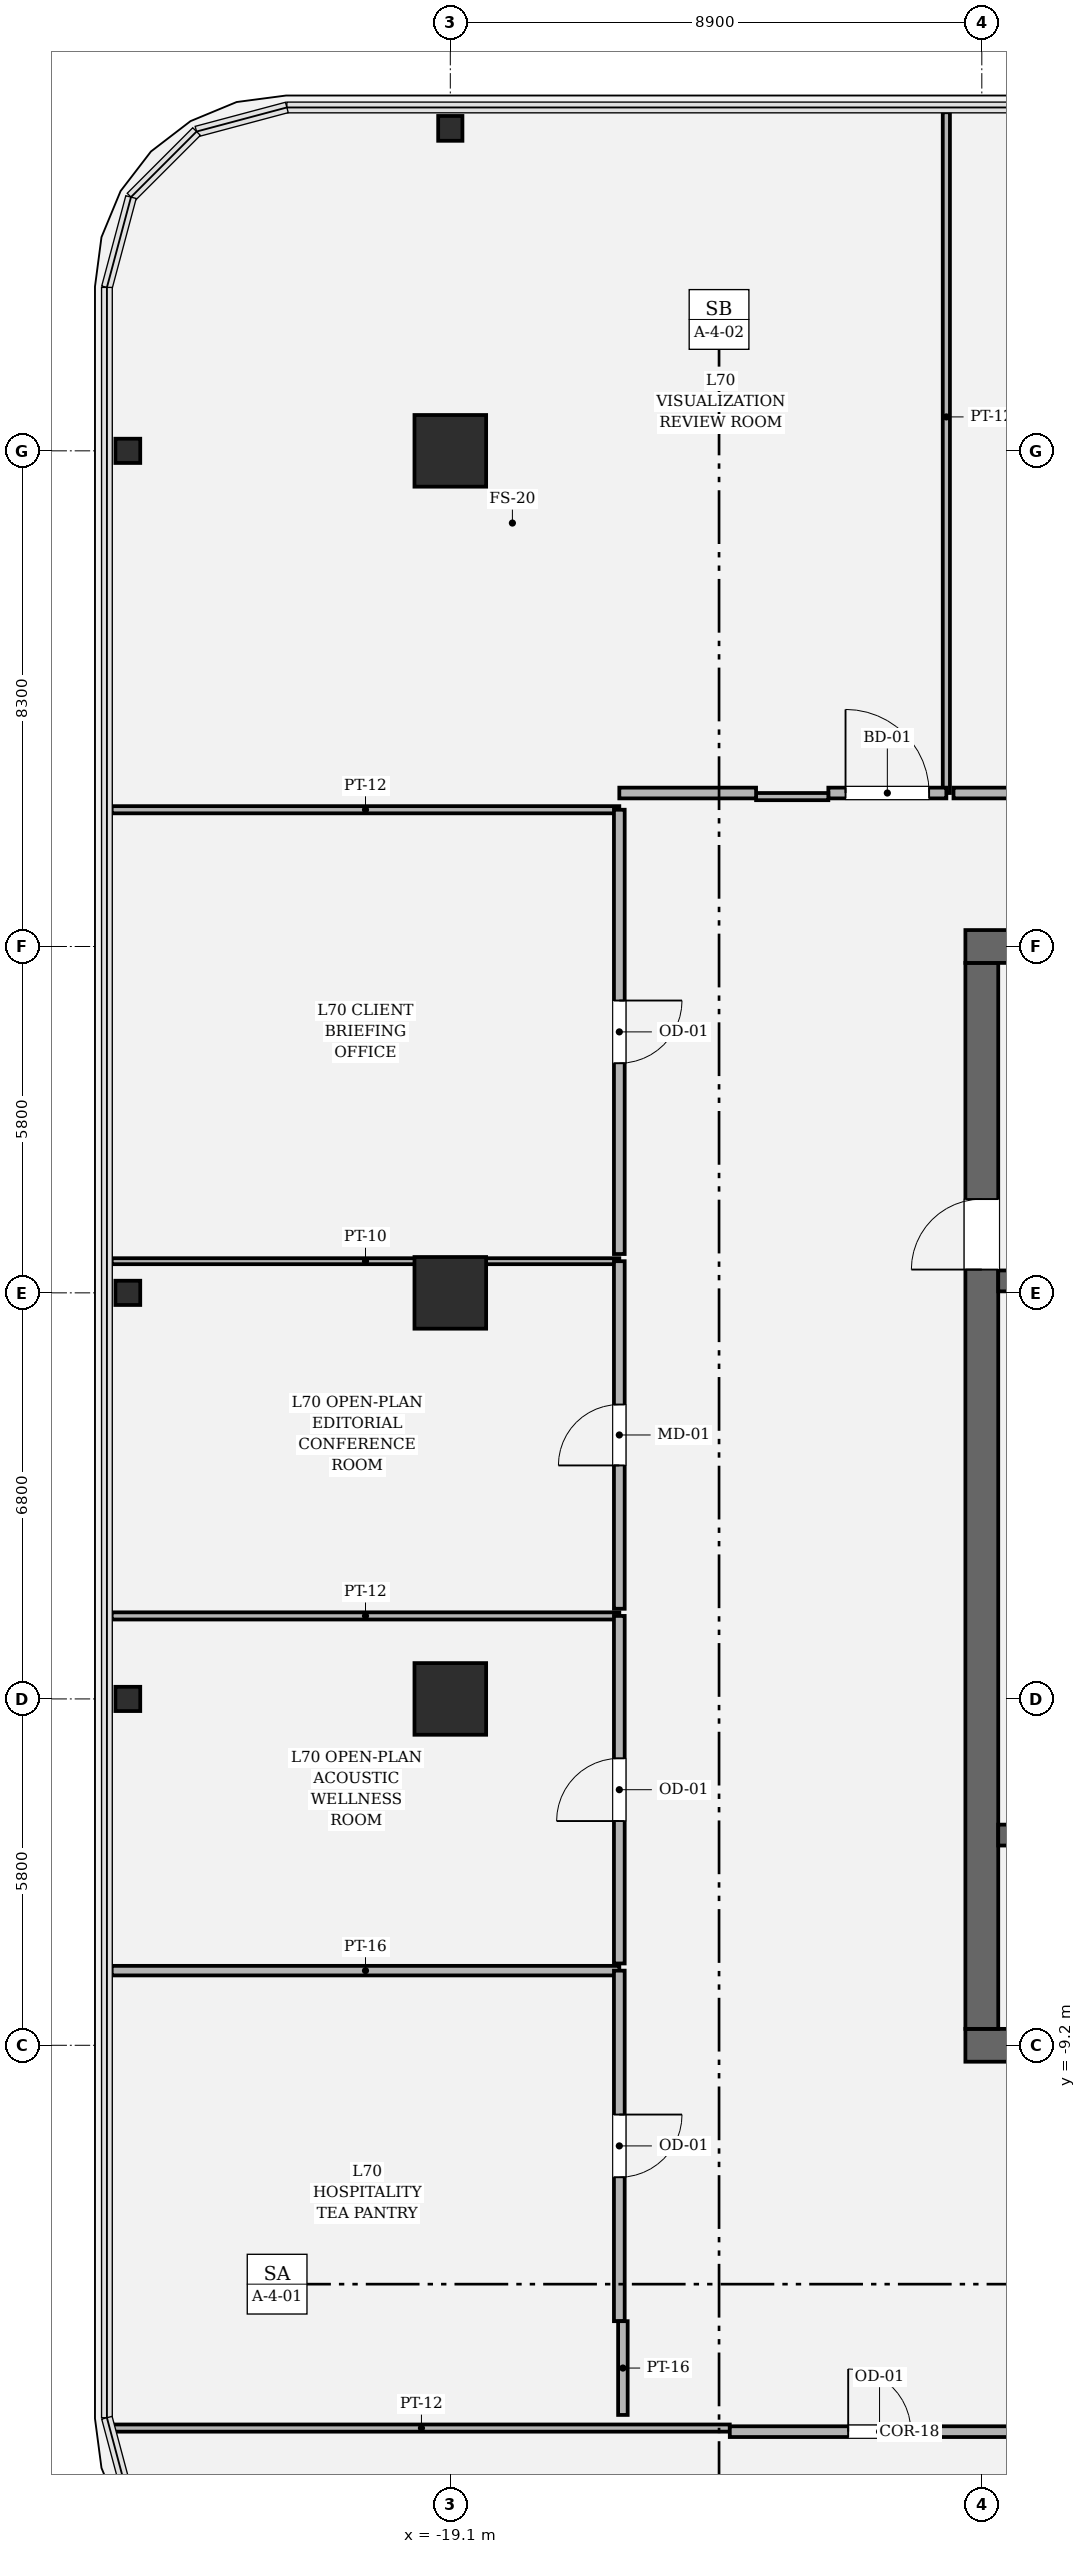
"""IFC4 building model, lengths in metres.
Left out: names, types, materials, properties, quantities, classifications, styles, units other than length and angle.
Written with IfcOpenShell. Run it as: python <this file> out.ifc"""

import sys

from ifc_helpers import new_model, si_unit, direction, frame, frame_2d, origin, origin_2d, place, context, subcontext, project, spatial, rectangle, hollow_rectangle, i_section, extrude, element, fill, save


model = new_model("IFC4")
c1 = context("Model", 3, precision=1e-05, world=origin(), true_north=direction((0.0, 1.0)))
c2 = subcontext(c1, "Body", "Model", "MODEL_VIEW")
j1 = project(units=[si_unit("LENGTHUNIT", "METRE"), si_unit("PLANEANGLEUNIT", "RADIAN")], contexts=[c1])
p1 = place(None, origin())
s1 = spatial("IfcSite", under=j1, at=p1, CompositionType="ELEMENT")
p2 = place(p1, origin())
s2 = spatial("IfcBuilding", under=s1, at=p2, CompositionType="ELEMENT")
p3 = place(p2, frame((0.0, 0.0, 296.4)))
s3 = spatial("IfcBuildingStorey", under=s2, at=p3, CompositionType="ELEMENT", Elevation=296.4)
p4 = place(p3, frame((10.475, -9.2, 0.0), z_axis=(0.0, 0.0, 1.0), x_axis=(-1.0, 0.0, 0.0)))
e1 = element("IfcWall", 1, at=p4, inside=s3, PredefinedType="SHEAR", context=c2, shape_type="SweptSolid", body=[
    extrude(rectangle(XDim=20.95, YDim=0.55, at=frame_2d((10.475, 0.0))), origin(), (0.0, 0.0, 1.0), 4.2),
])
p5 = place(p4, frame((2.75, 0.0, 0.0)))
e2 = element("IfcOpeningElement", 2, at=p5, cuts=e1, PredefinedType="OPENING", context=c2, shape_type="SweptSolid", body=[
    extrude(rectangle(XDim=1.25, YDim=2.25, at=frame_2d((0.625, 1.125))), frame((0.0, 0.285, 0.0), z_axis=(0.0, -1.0, 0.0), x_axis=(1.0, 0.0, 0.0)), (0.0, 0.0, 1.0), 0.57),
])
p6 = place(p4, frame((16.95, 0.0, 0.0)))
e3 = element("IfcOpeningElement", 3, at=p6, cuts=e1, PredefinedType="OPENING", context=c2, shape_type="SweptSolid", body=[
    extrude(rectangle(XDim=1.25, YDim=2.25, at=frame_2d((0.625, 1.125))), frame((0.0, 0.285, 0.0), z_axis=(0.0, -1.0, 0.0), x_axis=(1.0, 0.0, 0.0)), (0.0, 0.0, 1.0), 0.57),
])
p7 = place(p3, frame((-10.2, -8.925, 0.0), z_axis=(0.0, 0.0, 1.0), x_axis=(0.0, 1.0, 0.0)))
e4 = element("IfcWall", 4, at=p7, inside=s3, PredefinedType="SHEAR", context=c2, shape_type="SweptSolid", body=[
    extrude(rectangle(XDim=17.85, YDim=0.55, at=frame_2d((8.925, 0.0))), origin(), (0.0, 0.0, 1.0), 4.2),
])
p8 = place(p7, frame((12.715, 0.0, 0.0)))
e5 = element("IfcOpeningElement", 5, at=p8, cuts=e4, PredefinedType="OPENING", context=c2, shape_type="SweptSolid", body=[
    extrude(rectangle(XDim=1.18, YDim=2.2, at=frame_2d((0.59, 1.1))), frame((0.0, 0.285, 0.0), z_axis=(0.0, -1.0, 0.0), x_axis=(1.0, 0.0, 0.0)), (0.0, 0.0, 1.0), 0.57),
])
p9 = place(p3, frame((-10.475, 9.2, 0.0), z_axis=(0.0, 0.0, 1.0), x_axis=(1.0, 0.0, 0.0)))
e6 = element("IfcWall", 6, at=p9, inside=s3, PredefinedType="SHEAR", context=c2, shape_type="SweptSolid", body=[
    extrude(rectangle(XDim=20.95, YDim=0.55, at=frame_2d((10.475, 0.0))), origin(), (0.0, 0.0, 1.0), 4.2),
])
p10 = place(p3, frame((-9.925, -5.68, 0.0), z_axis=(0.0, 0.0, 1.0), x_axis=(1.0, 0.0, 0.0)))
e7 = element("IfcWall", 7, at=p10, inside=s3, PredefinedType="SOLIDWALL", context=c2, shape_type="SweptSolid", body=[
    extrude(rectangle(XDim=5.275, YDim=0.35, at=frame_2d((2.638, 0.0))), origin(), (0.0, 0.0, 1.0), 4.2),
])
p11 = place(p10, frame((1.385, 0.0, 0.0)))
e8 = element("IfcOpeningElement", 8, at=p11, cuts=e7, PredefinedType="OPENING", context=c2, shape_type="SweptSolid", body=[
    extrude(rectangle(XDim=1.18, YDim=2.2, at=frame_2d((0.59, 1.1))), frame((0.0, 0.185, 0.0), z_axis=(0.0, -1.0, 0.0), x_axis=(1.0, 0.0, 0.0)), (0.0, 0.0, 1.0), 0.37),
])
p12 = place(p3, frame((-9.925, 3.6, 0.0), z_axis=(0.0, 0.0, 1.0), x_axis=(1.0, 0.0, 0.0)))
e9 = element("IfcWall", 9, at=p12, inside=s3, PredefinedType="SOLIDWALL", context=c2, shape_type="SweptSolid", body=[
    extrude(rectangle(XDim=5.275, YDim=0.35, at=frame_2d((2.638, 0.0))), origin(), (0.0, 0.0, 1.0), 4.2),
])
for number, where, z_axis, x_axis in (
    (10, (-19.1, 17.5, 0.0), (0.0, 0.0, 1.0), (1.0, 0.0, 0.0)),
    (11, (-19.1, 3.4, 0.0), (0.0, 0.0, 1.0), (1.0, 0.0, 0.0)),
    (12, (-19.1, -3.4, 0.0), (0.0, 0.0, 1.0), (1.0, 0.0, 0.0)),
):
    element("IfcColumn", number, at=place(p3, frame(where, z_axis=z_axis, x_axis=x_axis)), inside=s3, PredefinedType="COLUMN", context=c2, shape_type="SweptSolid", body=[
        extrude(hollow_rectangle(XDim=1.2, YDim=1.2, WallThickness=0.035, at=origin_2d()), origin(), (0.0, 0.0, 1.0), 4.2),
    ])
for number, where, z_axis, x_axis in (
    (13, (-19.1, 22.9, 0.0), (0.0, 0.0, 1.0), (1.0, 0.0, 0.0)),
    (14, (-24.5, -3.4, 0.0), (0.0, 0.0, 1.0), (0.0, 1.0, 0.0)),
    (15, (-24.5, 3.4, 0.0), (0.0, 0.0, 1.0), (0.0, 1.0, 0.0)),
    (16, (-24.5, 17.5, 0.0), (0.0, 0.0, 1.0), (0.0, 1.0, 0.0)),
):
    element("IfcColumn", number, at=place(p3, frame(where, z_axis=z_axis, x_axis=x_axis)), inside=s3, PredefinedType="COLUMN", context=c2, shape_type="SweptSolid", body=[
        extrude(i_section(OverallWidth=0.406, OverallDepth=0.416, WebThickness=0.029, FlangeThickness=0.048, FilletRadius=0.018, at=origin_2d()), origin(), (0.0, 0.0, 1.0), 4.198),
    ])
p13 = place(p3, frame((-24.747, -15.61, 0.0), z_axis=(0.0, 0.0, 1.0), x_axis=(1.0, 0.0, 0.0)))
e17 = element("IfcWall", 17, at=p13, inside=s3, PredefinedType="PARTITIONING", context=c2, shape_type="SweptSolid", body=[
    extrude(rectangle(XDim=10.327, YDim=0.12, at=frame_2d((5.163, 0.0))), origin(), (0.0, 0.0, 1.0), 2.714),
])
p14 = place(p3, frame((-14.42, -15.67, 0.0), z_axis=(0.0, 0.0, 1.0), x_axis=(1.0, 0.0, 0.0)))
e18 = element("IfcWall", 18, at=p14, inside=s3, PredefinedType="PARTITIONING", context=c2, shape_type="SweptSolid", body=[
    extrude(rectangle(XDim=5.015, YDim=0.18, at=frame_2d((2.507, 0.0))), origin(), (0.0, 0.0, 1.0), 3.394),
])
p15 = place(p14, frame((1.982, 0.0, 0.0)))
e19 = element("IfcOpeningElement", 19, at=p15, cuts=e18, PredefinedType="OPENING", context=c2, shape_type="SweptSolid", body=[
    extrude(rectangle(XDim=1.05, YDim=2.2, at=frame_2d((0.525, 1.1))), frame((0.0, 0.1, 0.0), z_axis=(0.0, -1.0, 0.0), x_axis=(1.0, 0.0, 0.0)), (0.0, 0.0, 1.0), 0.2),
])
p16 = place(p3, frame((-24.77, -7.95, 0.0), z_axis=(0.0, 0.0, 1.0), x_axis=(1.0, 0.0, 0.0)))
e20 = element("IfcWall", 20, at=p16, inside=s3, PredefinedType="PARTITIONING", context=c2, shape_type="SweptSolid", body=[
    extrude(rectangle(XDim=8.5, YDim=0.16, at=frame_2d((4.25, 0.0))), origin(), (0.0, 0.0, 1.0), 2.714),
])
p17 = place(p3, frame((-16.27, -7.95, 0.0), z_axis=(0.0, 0.0, 1.0), x_axis=(0.0, -1.0, 0.0)))
e21 = element("IfcWall", 21, at=p17, inside=s3, PredefinedType="PARTITIONING", context=c2, shape_type="SweptSolid", body=[
    extrude(rectangle(XDim=5.87, YDim=0.18, at=frame_2d((2.935, 0.0))), origin(), (0.0, 0.0, 1.0), 3.394),
])
p18 = place(p17, frame((2.41, 0.0, 0.0)))
e22 = element("IfcOpeningElement", 22, at=p18, cuts=e21, PredefinedType="OPENING", context=c2, shape_type="SweptSolid", body=[
    extrude(rectangle(XDim=1.05, YDim=2.2, at=frame_2d((0.525, 1.1))), frame((0.0, 0.1, 0.0), z_axis=(0.0, -1.0, 0.0), x_axis=(1.0, 0.0, 0.0)), (0.0, 0.0, 1.0), 0.2),
])
p19 = place(p3, frame((-16.21, -13.82, 0.0), z_axis=(0.0, 0.0, 1.0), x_axis=(0.0, -1.0, 0.0)))
e23 = element("IfcWall", 23, at=p19, inside=s3, PredefinedType="PARTITIONING", context=c2, shape_type="SweptSolid", body=[
    extrude(rectangle(XDim=1.57, YDim=0.16, at=frame_2d((0.785, 0.0))), origin(), (0.0, 0.0, 1.0), 4.0),
])
p20 = place(p3, frame((-24.77, -2.01, 0.0), z_axis=(0.0, 0.0, 1.0), x_axis=(1.0, 0.0, 0.0)))
e24 = element("IfcWall", 24, at=p20, inside=s3, PredefinedType="PARTITIONING", context=c2, shape_type="SweptSolid", body=[
    extrude(rectangle(XDim=8.5, YDim=0.12, at=frame_2d((4.25, 0.0))), origin(), (0.0, 0.0, 1.0), 2.714),
])
p21 = place(p3, frame((-16.27, -2.01, 0.0), z_axis=(0.0, 0.0, 1.0), x_axis=(0.0, -1.0, 0.0)))
e25 = element("IfcWall", 25, at=p21, inside=s3, PredefinedType="PARTITIONING", context=c2, shape_type="SweptSolid", body=[
    extrude(rectangle(XDim=5.82, YDim=0.18, at=frame_2d((2.91, 0.0))), origin(), (0.0, 0.0, 1.0), 3.394),
])
p22 = place(p21, frame((2.385, 0.0, 0.0)))
e26 = element("IfcOpeningElement", 26, at=p22, cuts=e25, PredefinedType="OPENING", context=c2, shape_type="SweptSolid", body=[
    extrude(rectangle(XDim=1.05, YDim=2.2, at=frame_2d((0.525, 1.1))), frame((0.0, 0.1, 0.0), z_axis=(0.0, -1.0, 0.0), x_axis=(1.0, 0.0, 0.0)), (0.0, 0.0, 1.0), 0.2),
])
p23 = place(p3, frame((-24.77, 3.93, 0.0), z_axis=(0.0, 0.0, 1.0), x_axis=(1.0, 0.0, 0.0)))
e27 = element("IfcWall", 27, at=p23, inside=s3, PredefinedType="PARTITIONING", context=c2, shape_type="SweptSolid", body=[
    extrude(rectangle(XDim=8.5, YDim=0.1, at=frame_2d((4.25, 0.0))), origin(), (0.0, 0.0, 1.0), 2.714),
])
p24 = place(p3, frame((-16.27, 3.93, 0.0), z_axis=(0.0, 0.0, 1.0), x_axis=(0.0, -1.0, 0.0)))
e28 = element("IfcWall", 28, at=p24, inside=s3, PredefinedType="PARTITIONING", context=c2, shape_type="SweptSolid", body=[
    extrude(rectangle(XDim=5.82, YDim=0.18, at=frame_2d((2.91, 0.0))), origin(), (0.0, 0.0, 1.0), 3.394),
])
p25 = place(p24, frame((2.4, 0.0, 0.0)))
e29 = element("IfcOpeningElement", 29, at=p25, cuts=e28, PredefinedType="OPENING", context=c2, shape_type="SweptSolid", body=[
    extrude(rectangle(XDim=1.02, YDim=2.2, at=frame_2d((0.51, 1.1))), frame((0.0, 0.1, 0.0), z_axis=(0.0, -1.0, 0.0), x_axis=(1.0, 0.0, 0.0)), (0.0, 0.0, 1.0), 0.2),
])
p26 = place(p3, frame((-24.77, 11.49, 0.0), z_axis=(0.0, 0.0, 1.0), x_axis=(1.0, 0.0, 0.0)))
e30 = element("IfcWall", 30, at=p26, inside=s3, PredefinedType="PARTITIONING", context=c2, shape_type="SweptSolid", body=[
    extrude(rectangle(XDim=8.5, YDim=0.12, at=frame_2d((4.25, 0.0))), origin(), (0.0, 0.0, 1.0), 2.714),
])
p27 = place(p3, frame((-16.27, 11.49, 0.0), z_axis=(0.0, 0.0, 1.0), x_axis=(0.0, -1.0, 0.0)))
e31 = element("IfcWall", 31, at=p27, inside=s3, PredefinedType="PARTITIONING", context=c2, shape_type="SweptSolid", body=[
    extrude(rectangle(XDim=7.44, YDim=0.18, at=frame_2d((3.72, 0.0))), origin(), (0.0, 0.0, 1.0), 3.394),
])
p28 = place(p27, frame((3.195, 0.0, 0.0)))
e32 = element("IfcOpeningElement", 32, at=p28, cuts=e31, PredefinedType="OPENING", context=c2, shape_type="SweptSolid", body=[
    extrude(rectangle(XDim=1.05, YDim=2.2, at=frame_2d((0.525, 1.1))), frame((0.0, 0.1, 0.0), z_axis=(0.0, -1.0, 0.0), x_axis=(1.0, 0.0, 0.0)), (0.0, 0.0, 1.0), 0.2),
])
p29 = place(p3, frame((-10.794, 23.17, 0.0), z_axis=(0.0, 0.0, 1.0), x_axis=(0.0, -1.0, 0.0)))
e33 = element("IfcWall", 33, at=p29, inside=s3, PredefinedType="PARTITIONING", context=c2, shape_type="SweptSolid", body=[
    extrude(rectangle(XDim=11.4, YDim=0.12, at=frame_2d((5.7, 0.0))), origin(), (0.0, 0.0, 1.0), 2.714),
])
p30 = place(p3, frame((-10.794, 11.77, 0.0), z_axis=(0.0, 0.0, 1.0), x_axis=(-1.0, 0.0, 0.0)))
e34 = element("IfcWall", 34, at=p30, inside=s3, PredefinedType="PARTITIONING", context=c2, shape_type="SweptSolid", body=[
    extrude(rectangle(XDim=1.976, YDim=0.18, at=frame_2d((0.988, 0.0))), origin(), (0.0, 0.0, 1.0), 4.0),
])
p31 = place(p30, frame((0.288, 0.0, 0.0)))
e35 = element("IfcOpeningElement", 35, at=p31, cuts=e34, PredefinedType="OPENING", context=c2, shape_type="SweptSolid", body=[
    extrude(rectangle(XDim=1.4, YDim=2.25, at=frame_2d((0.7, 1.125))), frame((0.0, 0.1, 0.0), z_axis=(0.0, -1.0, 0.0), x_axis=(1.0, 0.0, 0.0)), (0.0, 0.0, 1.0), 0.2),
])
p32 = place(p3, frame((-12.77, 11.71, 0.0), z_axis=(0.0, 0.0, 1.0), x_axis=(-1.0, 0.0, 0.0)))
e36 = element("IfcWall", 36, at=p32, inside=s3, PredefinedType="PARTITIONING", context=c2, shape_type="SweptSolid", body=[
    extrude(rectangle(XDim=1.21, YDim=0.12, at=frame_2d((0.605, 0.0))), origin(), (0.0, 0.0, 1.0), 4.0),
])
p33 = place(p3, frame((-13.98, 11.77, 0.0), z_axis=(0.0, 0.0, 1.0), x_axis=(-1.0, 0.0, 0.0)))
e37 = element("IfcWall", 37, at=p33, inside=s3, PredefinedType="PARTITIONING", context=c2, shape_type="SweptSolid", body=[
    extrude(rectangle(XDim=2.29, YDim=0.18, at=frame_2d((1.145, 0.0))), origin(), (0.0, 0.0, 1.0), 3.634),
])
p34 = place(p3, frame((12.77, 11.77, 0.0), z_axis=(0.0, 0.0, 1.0), x_axis=(-1.0, 0.0, 0.0)))
e38 = element("IfcWall", 38, at=p34, inside=s3, PredefinedType="PARTITIONING", context=c2, shape_type="SweptSolid", body=[
    extrude(rectangle(XDim=23.444, YDim=0.18, at=frame_2d((11.722, 0.0))), origin(), (0.0, 0.0, 1.0), 3.394),
])
p35 = place(p34, frame((11.197, 0.0, 0.0)))
e39 = element("IfcOpeningElement", 39, at=p35, cuts=e38, PredefinedType="OPENING", context=c2, shape_type="SweptSolid", body=[
    extrude(rectangle(XDim=1.05, YDim=2.2, at=frame_2d((0.525, 1.1))), frame((0.0, 0.1, 0.0), z_axis=(0.0, -1.0, 0.0), x_axis=(1.0, 0.0, 0.0)), (0.0, 0.0, 1.0), 0.2),
])
p36 = place(p8, origin())
e40 = element("IfcDoor", 40, at=p36, inside=s3, OperationType="SINGLE_SWING_LEFT", PredefinedType="DOOR", context=c2, shape_type="SweptSolid", body=[
    extrude(rectangle(XDim=1.18, YDim=2.2, at=frame_2d((0.59, 1.1))), frame((0.0, 0.025, 0.0), z_axis=(0.0, -1.0, 0.0), x_axis=(1.0, 0.0, 0.0)), (0.0, 0.0, 1.0), 0.05),
])
fill(e5, e40)
p37 = place(p15, origin())
e41 = element("IfcDoor", 41, at=p37, inside=s3, OperationType="SINGLE_SWING_LEFT", PredefinedType="DOOR", context=c2, shape_type="SweptSolid", body=[
    extrude(rectangle(XDim=1.05, YDim=2.2, at=frame_2d((0.525, 1.1))), frame((0.0, 0.025, 0.0), z_axis=(0.0, -1.0, 0.0), x_axis=(1.0, 0.0, 0.0)), (0.0, 0.0, 1.0), 0.05),
])
fill(e19, e41)
p38 = place(p18, origin())
e42 = element("IfcDoor", 42, at=p38, inside=s3, OperationType="SINGLE_SWING_LEFT", PredefinedType="DOOR", context=c2, shape_type="SweptSolid", body=[
    extrude(rectangle(XDim=1.05, YDim=2.2, at=frame_2d((0.525, 1.1))), frame((0.0, 0.025, 0.0), z_axis=(0.0, -1.0, 0.0), x_axis=(1.0, 0.0, 0.0)), (0.0, 0.0, 1.0), 0.05),
])
fill(e22, e42)
p39 = place(p22, origin())
e43 = element("IfcDoor", 43, at=p39, inside=s3, OperationType="SINGLE_SWING_RIGHT", PredefinedType="DOOR", context=c2, shape_type="SweptSolid", body=[
    extrude(rectangle(XDim=1.05, YDim=2.2, at=frame_2d((0.525, 1.1))), frame((0.0, 0.025, 0.0), z_axis=(0.0, -1.0, 0.0), x_axis=(1.0, 0.0, 0.0)), (0.0, 0.0, 1.0), 0.05),
])
fill(e26, e43)
p40 = place(p25, origin())
e44 = element("IfcDoor", 44, at=p40, inside=s3, OperationType="SINGLE_SWING_RIGHT", PredefinedType="DOOR", context=c2, shape_type="SweptSolid", body=[
    extrude(rectangle(XDim=1.02, YDim=2.2, at=frame_2d((0.51, 1.1))), frame((0.0, 0.025, 0.0), z_axis=(0.0, -1.0, 0.0), x_axis=(1.0, 0.0, 0.0)), (0.0, 0.0, 1.0), 0.05),
])
fill(e29, e44)
p41 = place(p28, origin())
e45 = element("IfcDoor", 45, at=p41, inside=s3, OperationType="SINGLE_SWING_LEFT", PredefinedType="DOOR", context=c2, shape_type="SweptSolid", body=[
    extrude(rectangle(XDim=1.05, YDim=2.2, at=frame_2d((0.525, 1.1))), frame((0.0, 0.025, 0.0), z_axis=(0.0, -1.0, 0.0), x_axis=(1.0, 0.0, 0.0)), (0.0, 0.0, 1.0), 0.05),
])
fill(e32, e45)
p42 = place(p31, origin())
e46 = element("IfcDoor", 46, at=p42, inside=s3, OperationType="SINGLE_SWING_RIGHT", PredefinedType="DOOR", context=c2, shape_type="SweptSolid", body=[
    extrude(rectangle(XDim=1.4, YDim=2.25, at=frame_2d((0.7, 1.125))), frame((0.0, 0.025, 0.0), z_axis=(0.0, -1.0, 0.0), x_axis=(1.0, 0.0, 0.0)), (0.0, 0.0, 1.0), 0.05),
])
fill(e35, e46)
save(model, sys.argv[1])
